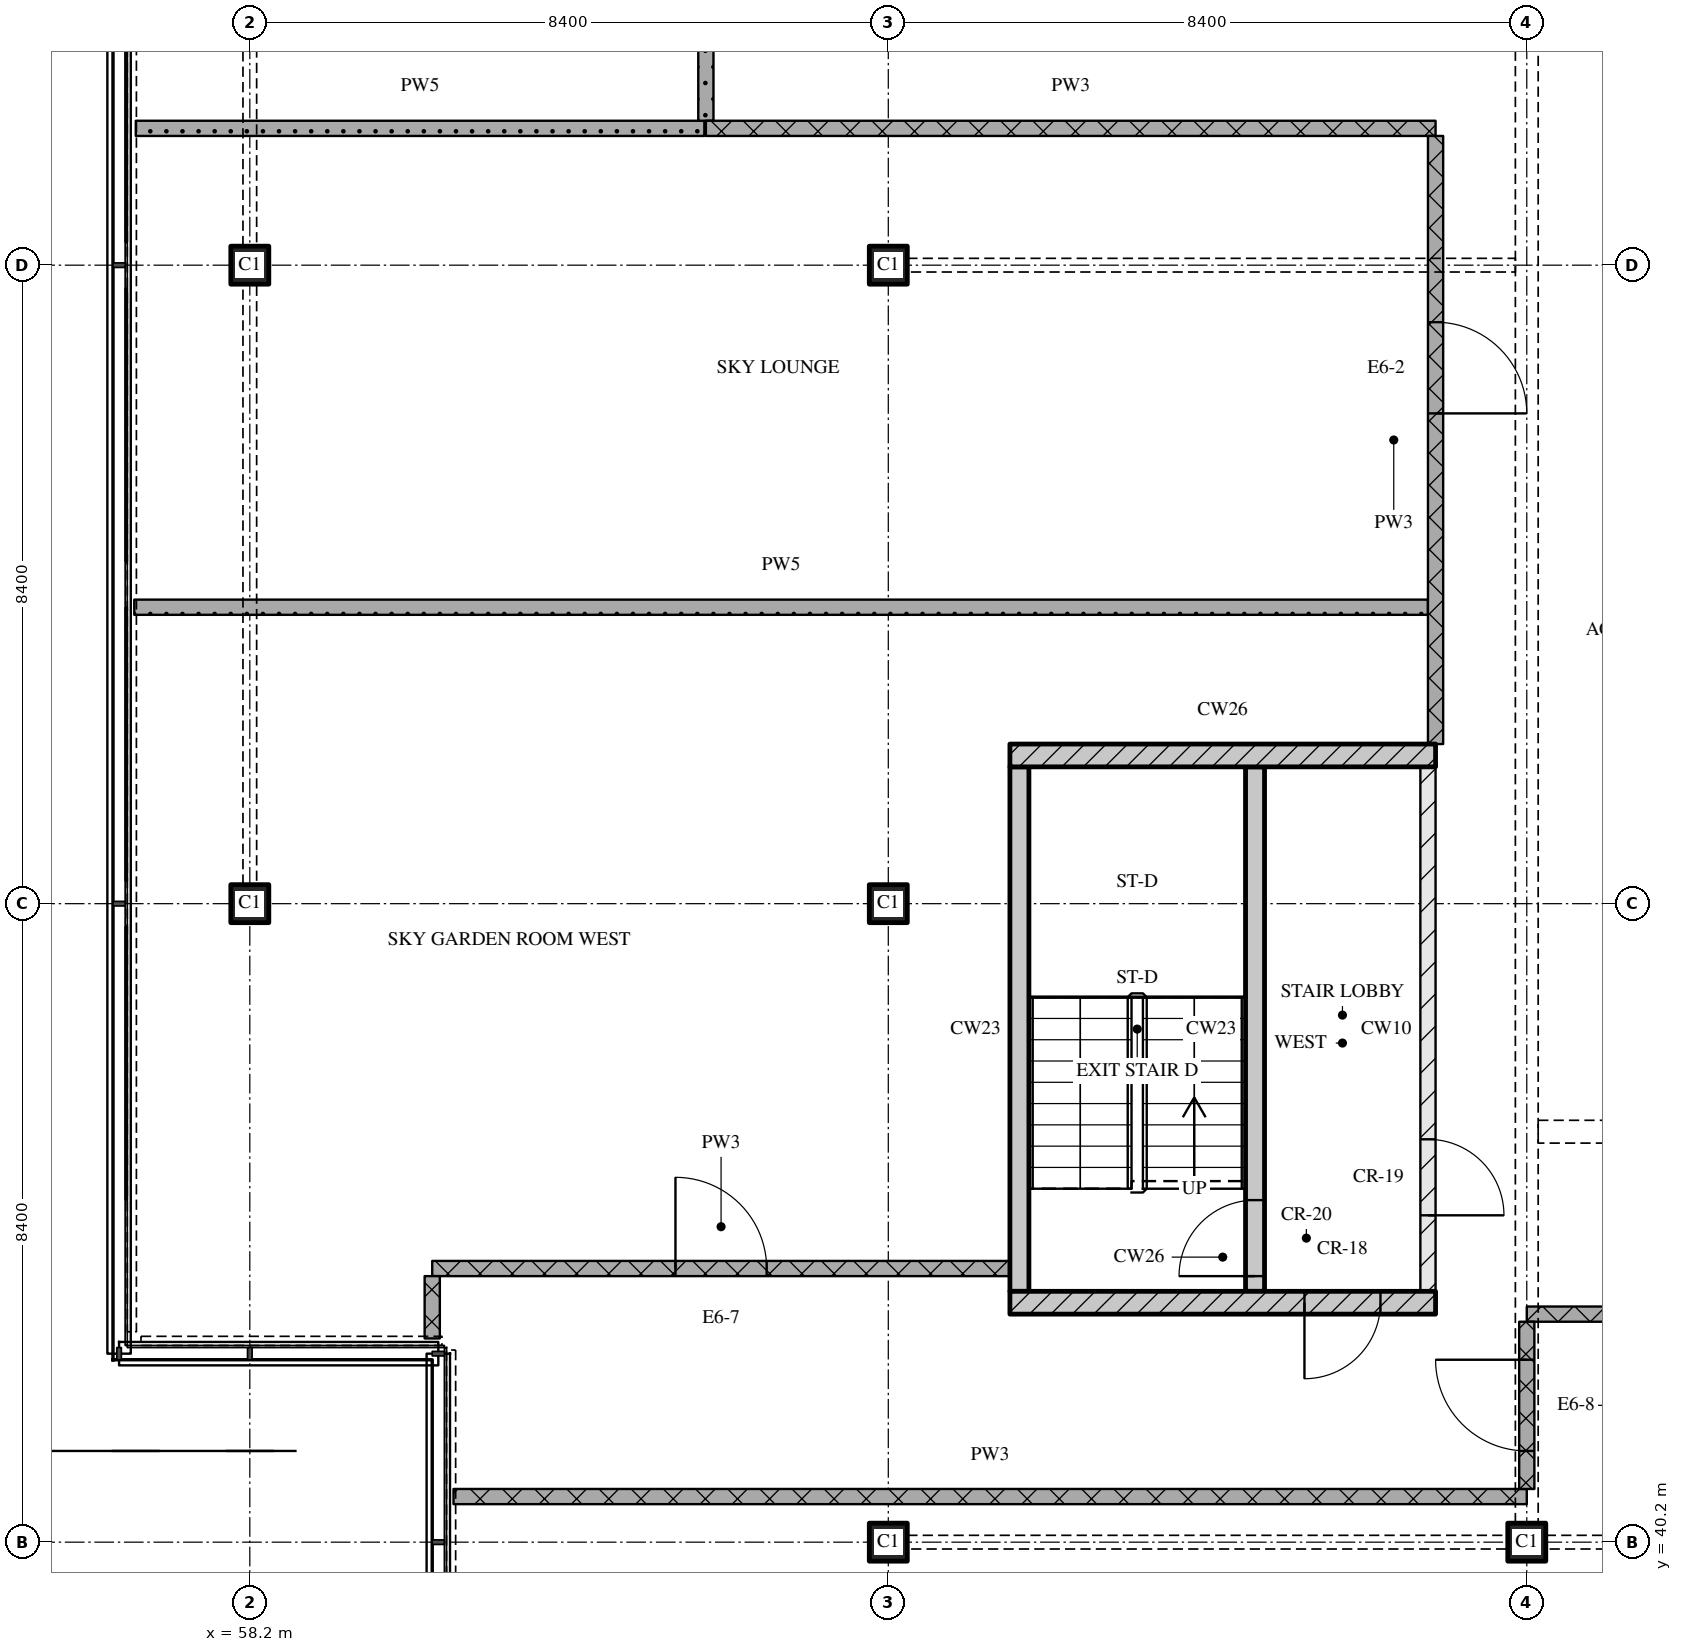
"""IFC4 building model, lengths in metres.
Left out: names, types, materials, properties, quantities, classifications, styles, units other than length and angle.
Written with IfcOpenShell. Run it as: python <this file> out.ifc"""

import sys

from ifc_helpers import new_model, si_unit, direction, frame, frame_2d, origin, origin_2d, place, context, subcontext, project, spatial, rectangle, extrude, element, fill, save


model = new_model("IFC4")
c1 = context("Model", 3, precision=1e-05, world=origin(), true_north=direction((0.0, 1.0)))
c2 = subcontext(c1, "Body", "Model", "MODEL_VIEW")
j1 = project(units=[si_unit("LENGTHUNIT", "METRE"), si_unit("PLANEANGLEUNIT", "RADIAN")], contexts=[c1])
p1 = place(None, origin())
s1 = spatial("IfcSite", under=j1, at=p1, CompositionType="ELEMENT")
p2 = place(p1, origin())
s2 = spatial("IfcBuilding", under=s1, at=p2, CompositionType="ELEMENT")
p3 = place(p2, frame((0.0, 0.0, 303.15)))
s3 = spatial("IfcBuildingStorey", under=s2, at=p3, CompositionType="ELEMENT", Elevation=303.15)
for number, where, z_axis, x_axis in (
    (1, (58.2, 48.6, 0.0), (0.0, 0.0, 1.0), (1.0, 0.0, 0.0)),
    (2, (58.2, 57.0, 0.0), (0.0, 0.0, 1.0), (1.0, 0.0, 0.0)),
    (3, (66.6, 40.2, 0.0), (0.0, 0.0, 1.0), (1.0, 0.0, 0.0)),
    (4, (66.6, 48.6, 0.0), (0.0, 0.0, 1.0), (1.0, 0.0, 0.0)),
    (5, (66.6, 57.0, 0.0), (0.0, 0.0, 1.0), (1.0, 0.0, 0.0)),
    (6, (75.0, 40.2, 0.0), (0.0, 0.0, 1.0), (1.0, 0.0, 0.0)),
):
    element("IfcColumn", number, at=place(p3, frame(where, z_axis=z_axis, x_axis=x_axis)), inside=s3, PredefinedType="COLUMN", context=c2, shape_type="SweptSolid", body=[
        extrude(rectangle(XDim=0.5, YDim=0.5, at=origin_2d()), origin(), (0.0, 0.0, 1.0), 3.6),
    ])
p4 = place(p3, frame((68.2, 43.35, 0.0), z_axis=(0.0, 0.0, 1.0), x_axis=(1.0, 0.0, 0.0)))
e7 = element("IfcWall", 7, at=p4, inside=s3, PredefinedType="SOLIDWALL", context=c2, shape_type="SweptSolid", body=[
    extrude(rectangle(XDim=5.6, YDim=0.3, at=frame_2d((2.8, 0.0))), origin(), (0.0, 0.0, 1.0), 3.32),
])
p5 = place(p4, frame((3.875, 0.0, 0.0)))
e8 = element("IfcOpeningElement", 8, at=p5, cuts=e7, PredefinedType="OPENING", context=c2, shape_type="SweptSolid", body=[
    extrude(rectangle(XDim=1.0, YDim=2.1, at=frame_2d((0.5, 1.05))), frame((0.0, 0.16, 0.0), z_axis=(0.0, -1.0, 0.0), x_axis=(1.0, 0.0, 0.0)), (0.0, 0.0, 1.0), 0.32),
])
p6 = place(p3, frame((68.325, 43.5, 0.0), z_axis=(0.0, 0.0, 1.0), x_axis=(0.0, 1.0, 0.0)))
e9 = element("IfcWall", 9, at=p6, inside=s3, PredefinedType="SOLIDWALL", context=c2, shape_type="SweptSolid", body=[
    extrude(rectangle(XDim=6.9, YDim=0.25, at=frame_2d((3.45, 0.0))), origin(), (0.0, 0.0, 1.0), 3.32),
])
p7 = place(p3, frame((71.425, 43.5, 0.0), z_axis=(0.0, 0.0, 1.0), x_axis=(0.0, 1.0, 0.0)))
e10 = element("IfcWall", 10, at=p7, inside=s3, PredefinedType="SOLIDWALL", context=c2, shape_type="SweptSolid", body=[
    extrude(rectangle(XDim=6.9, YDim=0.25, at=frame_2d((3.45, 0.0))), origin(), (0.0, 0.0, 1.0), 3.32),
])
p8 = place(p7, frame((0.2, 0.0, 0.0)))
e11 = element("IfcOpeningElement", 11, at=p8, cuts=e10, PredefinedType="OPENING", context=c2, shape_type="SweptSolid", body=[
    extrude(rectangle(XDim=1.0, YDim=2.1, at=frame_2d((0.5, 1.05))), frame((0.0, 0.135, 0.0), z_axis=(0.0, -1.0, 0.0), x_axis=(1.0, 0.0, 0.0)), (0.0, 0.0, 1.0), 0.27),
])
p9 = place(p3, frame((73.7, 43.5, 0.0), z_axis=(0.0, 0.0, 1.0), x_axis=(0.0, 1.0, 0.0)))
e12 = element("IfcWall", 12, at=p9, inside=s3, PredefinedType="PARTITIONING", context=c2, shape_type="SweptSolid", body=[
    extrude(rectangle(XDim=6.9, YDim=0.2, at=frame_2d((3.45, 0.0))), origin(), (0.0, 0.0, 1.0), 3.32),
])
p10 = place(p9, frame((1.0, 0.0, 0.0)))
e13 = element("IfcOpeningElement", 13, at=p10, cuts=e12, PredefinedType="OPENING", context=c2, shape_type="SweptSolid", body=[
    extrude(rectangle(XDim=1.0, YDim=2.1, at=frame_2d((0.5, 1.05))), frame((0.0, 0.11, 0.0), z_axis=(0.0, -1.0, 0.0), x_axis=(1.0, 0.0, 0.0)), (0.0, 0.0, 1.0), 0.22),
])
p11 = place(p3, frame((68.2, 50.55, 0.0), z_axis=(0.0, 0.0, 1.0), x_axis=(1.0, 0.0, 0.0)))
e14 = element("IfcWall", 14, at=p11, inside=s3, PredefinedType="SOLIDWALL", context=c2, shape_type="SweptSolid", body=[
    extrude(rectangle(XDim=5.6, YDim=0.3, at=frame_2d((2.8, 0.0))), origin(), (0.0, 0.0, 1.0), 3.32),
])
p12 = place(p3, frame((60.88, 40.8, 0.0), z_axis=(0.0, 0.0, 1.0), x_axis=(1.0, 0.0, 0.0)))
e15 = element("IfcWall", 15, at=p12, inside=s3, PredefinedType="PARTITIONING", context=c2, shape_type="SweptSolid", body=[
    extrude(rectangle(XDim=14.12, YDim=0.2, at=frame_2d((7.06, 0.0))), origin(), (0.0, 0.0, 1.0), 3.32),
])
p13 = place(p3, frame((100.2, 43.2, 0.0), z_axis=(0.0, 0.0, 1.0), x_axis=(-1.0, 0.0, 0.0)))
e16 = element("IfcWall", 16, at=p13, inside=s3, PredefinedType="PARTITIONING", context=c2, shape_type="SweptSolid", body=[
    extrude(rectangle(XDim=25.2, YDim=0.2, at=frame_2d((12.6, 0.0))), origin(), (0.0, 0.0, 1.0), 3.32),
])
p14 = place(p13, frame((12.0, 0.0, 0.0)))
e17 = element("IfcOpeningElement", 17, at=p14, cuts=e16, PredefinedType="OPENING", context=c2, shape_type="SweptSolid", body=[
    extrude(rectangle(XDim=1.2, YDim=2.1, at=frame_2d((0.6, 1.05))), frame((0.0, 0.11, 0.0), z_axis=(0.0, -1.0, 0.0), x_axis=(1.0, 0.0, 0.0)), (0.0, 0.0, 1.0), 0.22),
])
p15 = place(p3, frame((60.6, 43.8, 0.0), z_axis=(0.0, 0.0, 1.0), x_axis=(1.0, 0.0, 0.0)))
e18 = element("IfcWall", 18, at=p15, inside=s3, PredefinedType="PARTITIONING", context=c2, shape_type="SweptSolid", body=[
    extrude(rectangle(XDim=7.6, YDim=0.2, at=frame_2d((3.8, 0.0))), origin(), (0.0, 0.0, 1.0), 3.32),
])
p16 = place(p15, frame((3.2, 0.0, 0.0)))
e19 = element("IfcOpeningElement", 19, at=p16, cuts=e18, PredefinedType="OPENING", context=c2, shape_type="SweptSolid", body=[
    extrude(rectangle(XDim=1.2, YDim=2.1, at=frame_2d((0.6, 1.05))), frame((0.0, 0.11, 0.0), z_axis=(0.0, -1.0, 0.0), x_axis=(1.0, 0.0, 0.0)), (0.0, 0.0, 1.0), 0.22),
])
p17 = place(p3, frame((56.68, 52.5, 0.0), z_axis=(0.0, 0.0, 1.0), x_axis=(1.0, 0.0, 0.0)))
e20 = element("IfcWall", 20, at=p17, inside=s3, PredefinedType="PARTITIONING", context=c2, shape_type="SweptSolid", body=[
    extrude(rectangle(XDim=17.02, YDim=0.2, at=frame_2d((8.51, 0.0))), origin(), (0.0, 0.0, 1.0), 3.32),
])
p18 = place(p3, frame((64.2, 58.8, 0.0), z_axis=(0.0, 0.0, 1.0), x_axis=(1.0, 0.0, 0.0)))
e21 = element("IfcWall", 21, at=p18, inside=s3, PredefinedType="PARTITIONING", context=c2, shape_type="SweptSolid", body=[
    extrude(rectangle(XDim=9.6, YDim=0.2, at=frame_2d((4.8, 0.0))), origin(), (0.0, 0.0, 1.0), 3.32),
])
p19 = place(p3, frame((56.7, 58.8, 0.0), z_axis=(0.0, 0.0, 1.0), x_axis=(1.0, 0.0, 0.0)))
e22 = element("IfcWall", 22, at=p19, inside=s3, PredefinedType="PARTITIONING", context=c2, shape_type="SweptSolid", body=[
    extrude(rectangle(XDim=7.48, YDim=0.2, at=frame_2d((3.74, 0.0))), origin(), (0.0, 0.0, 1.0), 3.32),
])
p20 = place(p3, frame((60.6, 43.7, 0.0), z_axis=(0.0, 0.0, 1.0), x_axis=(0.0, -1.0, 0.0)))
e23 = element("IfcWall", 23, at=p20, inside=s3, PredefinedType="PARTITIONING", context=c2, shape_type="SweptSolid", body=[
    extrude(rectangle(XDim=0.82, YDim=0.2, at=frame_2d((0.41, 0.0))), origin(), (0.0, 0.0, 1.0), 3.32),
])
p21 = place(p3, frame((64.2, 61.1, 0.0), z_axis=(0.0, 0.0, 1.0), x_axis=(0.0, -1.0, 0.0)))
e24 = element("IfcWall", 24, at=p21, inside=s3, PredefinedType="PARTITIONING", context=c2, shape_type="SweptSolid", body=[
    extrude(rectangle(XDim=2.2, YDim=0.2, at=frame_2d((1.1, 0.0))), origin(), (0.0, 0.0, 1.0), 3.32),
])
p22 = place(p3, frame((73.8, 50.7, 0.0), z_axis=(0.0, 0.0, 1.0), x_axis=(0.0, 1.0, 0.0)))
e25 = element("IfcWall", 25, at=p22, inside=s3, PredefinedType="PARTITIONING", context=c2, shape_type="SweptSolid", body=[
    extrude(rectangle(XDim=8.0, YDim=0.2, at=frame_2d((4.0, 0.0))), origin(), (0.0, 0.0, 1.0), 3.32),
])
p23 = place(p22, frame((4.35, 0.0, 0.0)))
e26 = element("IfcOpeningElement", 26, at=p23, cuts=e25, PredefinedType="OPENING", context=c2, shape_type="SweptSolid", body=[
    extrude(rectangle(XDim=1.2, YDim=2.1, at=frame_2d((0.6, 1.05))), frame((0.0, 0.11, 0.0), z_axis=(0.0, -1.0, 0.0), x_axis=(1.0, 0.0, 0.0)), (0.0, 0.0, 1.0), 0.22),
])
p24 = place(p3, frame((75.0, 43.1, 0.0), z_axis=(0.0, 0.0, 1.0), x_axis=(0.0, -1.0, 0.0)))
e27 = element("IfcWall", 27, at=p24, inside=s3, PredefinedType="PARTITIONING", context=c2, shape_type="SweptSolid", body=[
    extrude(rectangle(XDim=2.2, YDim=0.2, at=frame_2d((1.1, 0.0))), origin(), (0.0, 0.0, 1.0), 2.53),
])
p25 = place(p24, frame((0.5, 0.0, 0.0)))
e28 = element("IfcOpeningElement", 28, at=p25, cuts=e27, PredefinedType="OPENING", context=c2, shape_type="SweptSolid", body=[
    extrude(rectangle(XDim=1.2, YDim=2.1, at=frame_2d((0.6, 1.05))), frame((0.0, 0.11, 0.0), z_axis=(0.0, -1.0, 0.0), x_axis=(1.0, 0.0, 0.0)), (0.0, 0.0, 1.0), 0.22),
])
p26 = place(p5, origin())
e29 = element("IfcDoor", 29, at=p26, inside=s3, OperationType="SINGLE_SWING_RIGHT", PredefinedType="DOOR", context=c2, shape_type="SweptSolid", body=[
    extrude(rectangle(XDim=1.0, YDim=2.1, at=frame_2d((0.5, 1.05))), frame((0.0, 0.025, 0.0), z_axis=(0.0, -1.0, 0.0), x_axis=(1.0, 0.0, 0.0)), (0.0, 0.0, 1.0), 0.05),
])
fill(e8, e29)
p27 = place(p8, origin())
e30 = element("IfcDoor", 30, at=p27, inside=s3, OperationType="SINGLE_SWING_LEFT", PredefinedType="DOOR", context=c2, shape_type="SweptSolid", body=[
    extrude(rectangle(XDim=1.0, YDim=2.1, at=frame_2d((0.5, 1.05))), frame((0.0, 0.025, 0.0), z_axis=(0.0, -1.0, 0.0), x_axis=(1.0, 0.0, 0.0)), (0.0, 0.0, 1.0), 0.05),
])
fill(e11, e30)
p28 = place(p10, origin())
e31 = element("IfcDoor", 31, at=p28, inside=s3, OperationType="SINGLE_SWING_RIGHT", PredefinedType="DOOR", context=c2, shape_type="SweptSolid", body=[
    extrude(rectangle(XDim=1.0, YDim=2.1, at=frame_2d((0.5, 1.05))), frame((0.0, 0.025, 0.0), z_axis=(0.0, -1.0, 0.0), x_axis=(1.0, 0.0, 0.0)), (0.0, 0.0, 1.0), 0.05),
])
fill(e13, e31)
p29 = place(p16, origin())
e32 = element("IfcDoor", 32, at=p29, inside=s3, OperationType="SINGLE_SWING_LEFT", PredefinedType="DOOR", context=c2, shape_type="SweptSolid", body=[
    extrude(rectangle(XDim=1.2, YDim=2.1, at=frame_2d((0.6, 1.05))), frame((0.0, 0.025, 0.0), z_axis=(0.0, -1.0, 0.0), x_axis=(1.0, 0.0, 0.0)), (0.0, 0.0, 1.0), 0.05),
])
fill(e19, e32)
p30 = place(p23, origin())
e33 = element("IfcDoor", 33, at=p30, inside=s3, OperationType="SINGLE_SWING_RIGHT", PredefinedType="DOOR", context=c2, shape_type="SweptSolid", body=[
    extrude(rectangle(XDim=1.2, YDim=2.1, at=frame_2d((0.6, 1.05))), frame((0.0, 0.025, 0.0), z_axis=(0.0, -1.0, 0.0), x_axis=(1.0, 0.0, 0.0)), (0.0, 0.0, 1.0), 0.05),
])
fill(e26, e33)
p31 = place(p25, origin())
e34 = element("IfcDoor", 34, at=p31, inside=s3, OperationType="SINGLE_SWING_RIGHT", PredefinedType="DOOR", context=c2, shape_type="SweptSolid", body=[
    extrude(rectangle(XDim=1.2, YDim=2.1, at=frame_2d((0.6, 1.05))), frame((0.0, 0.025, 0.0), z_axis=(0.0, -1.0, 0.0), x_axis=(1.0, 0.0, 0.0)), (0.0, 0.0, 1.0), 0.05),
])
fill(e28, e34)
save(model, sys.argv[1])
